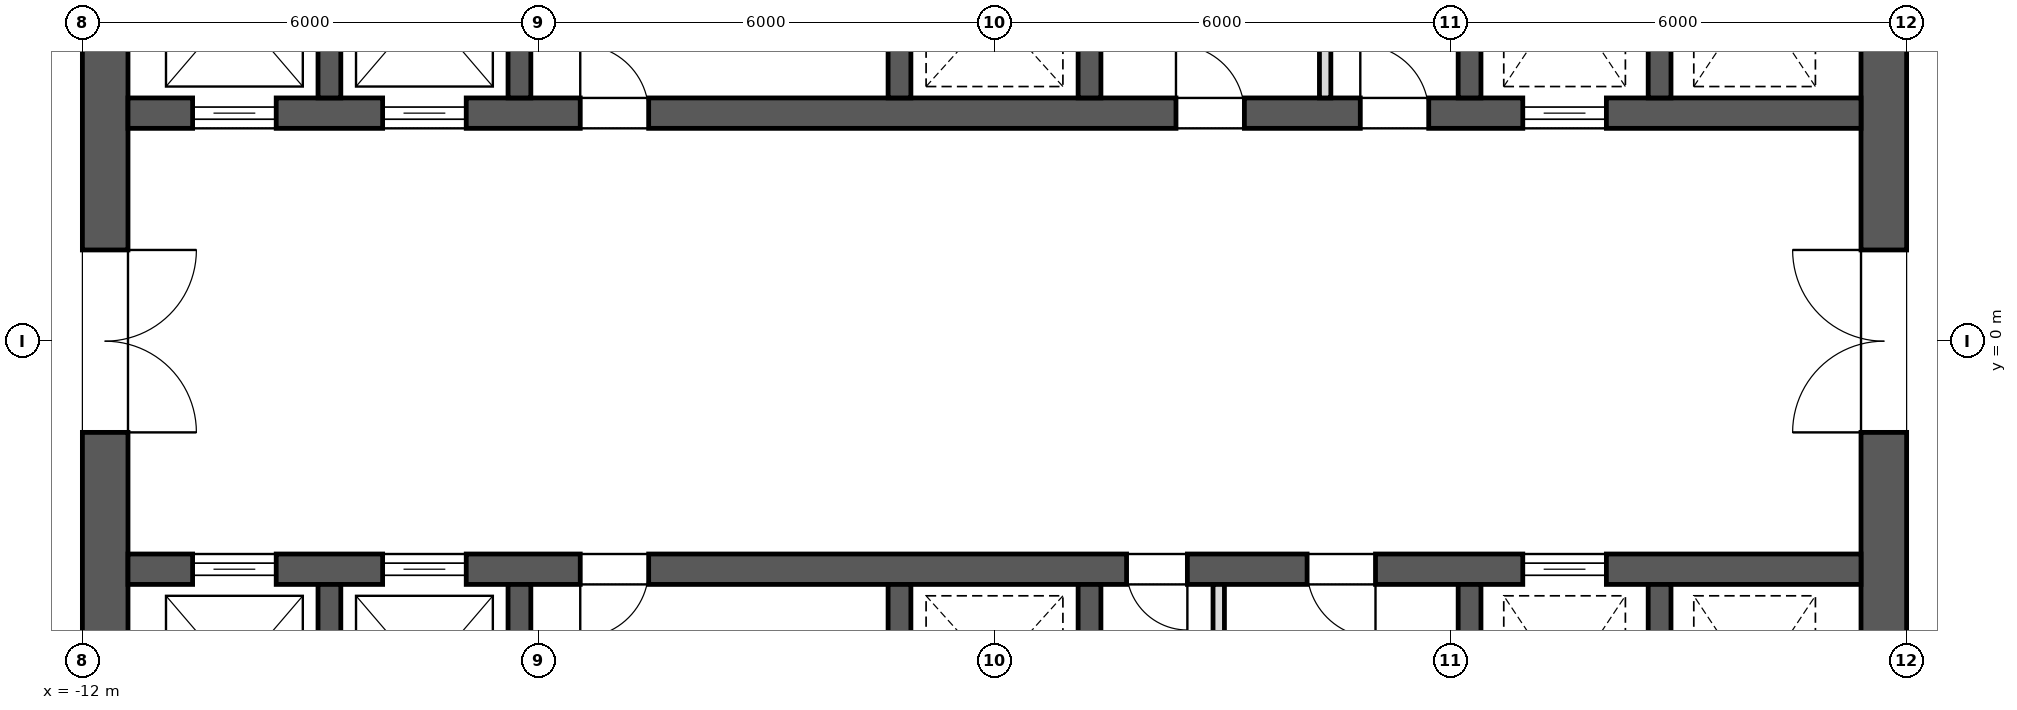
"""IFC4 building model, lengths in metres.
Left out: names, types, materials, properties, quantities, classifications, styles, units other than length and angle.
Written with IfcOpenShell. Run it as: python <this file> out.ifc"""

import sys

from ifc_helpers import new_model, si_unit, direction, frame, frame_2d, origin, place, context, subcontext, project, spatial, rectangle, extrude, element, fill, save


model = new_model("IFC4")
c1 = context("Model", 3, precision=1e-05, world=origin(), true_north=direction((0.0, 1.0)))
c2 = subcontext(c1, "Body", "Model", "MODEL_VIEW")
j1 = project(units=[si_unit("LENGTHUNIT", "METRE"), si_unit("PLANEANGLEUNIT", "RADIAN")], contexts=[c1])
p1 = place(None, origin())
s1 = spatial("IfcSite", under=j1, at=p1, CompositionType="ELEMENT")
p2 = place(p1, origin())
s2 = spatial("IfcBuilding", under=s1, at=p2, CompositionType="ELEMENT")
p3 = place(p2, frame((0.0, 0.0, 324.3)))
s3 = spatial("IfcBuildingStorey", under=s2, at=p3, CompositionType="ELEMENT", Elevation=324.3)
p4 = place(p3, frame((11.7, -11.4, 0.0), z_axis=(0.0, 0.0, 1.0), x_axis=(0.0, 1.0, 0.0)))
e1 = element("IfcWall", 1, at=p4, inside=s3, PredefinedType="SHEAR", context=c2, shape_type="SweptSolid", body=[
    extrude(rectangle(XDim=22.8, YDim=0.6, at=frame_2d((11.4, 0.0))), origin(), (0.0, 0.0, 1.0), 4.0),
])
p5 = place(p4, frame((10.2, 0.0, 0.0)))
e2 = element("IfcOpeningElement", 2, at=p5, cuts=e1, PredefinedType="OPENING", context=c2, shape_type="SweptSolid", body=[
    extrude(rectangle(XDim=2.4, YDim=2.1, at=frame_2d((1.2, 1.05))), frame((0.0, 0.312, 0.0), z_axis=(0.0, -1.0, 0.0), x_axis=(1.0, 0.0, 0.0)), (0.0, 0.0, 1.0), 0.624),
])
p6 = place(p4, frame((19.5, 0.0, 0.0)))
e3 = element("IfcOpeningElement", 3, at=p6, cuts=e1, PredefinedType="OPENING", context=c2, shape_type="SweptSolid", body=[
    extrude(rectangle(XDim=1.2, YDim=2.1, at=frame_2d((0.6, 1.05))), frame((0.0, 0.312, 0.0), z_axis=(0.0, -1.0, 0.0), x_axis=(1.0, 0.0, 0.0)), (0.0, 0.0, 1.0), 0.624),
])
p7 = place(p4, frame((2.1, 0.0, 0.0)))
e4 = element("IfcOpeningElement", 4, at=p7, cuts=e1, PredefinedType="OPENING", context=c2, shape_type="SweptSolid", body=[
    extrude(rectangle(XDim=1.2, YDim=2.1, at=frame_2d((0.6, 1.05))), frame((0.0, 0.312, 0.0), z_axis=(0.0, -1.0, 0.0), x_axis=(1.0, 0.0, 0.0)), (0.0, 0.0, 1.0), 0.624),
])
p8 = place(p3, frame((-11.7, -11.4, 0.0), z_axis=(0.0, 0.0, 1.0), x_axis=(0.0, 1.0, 0.0)))
e5 = element("IfcWall", 5, at=p8, inside=s3, PredefinedType="SHEAR", context=c2, shape_type="SweptSolid", body=[
    extrude(rectangle(XDim=22.8, YDim=0.6, at=frame_2d((11.4, 0.0))), origin(), (0.0, 0.0, 1.0), 4.0),
])
p9 = place(p8, frame((10.2, 0.0, 0.0)))
e6 = element("IfcOpeningElement", 6, at=p9, cuts=e5, PredefinedType="OPENING", context=c2, shape_type="SweptSolid", body=[
    extrude(rectangle(XDim=2.4, YDim=2.1, at=frame_2d((1.2, 1.05))), frame((0.0, 0.312, 0.0), z_axis=(0.0, -1.0, 0.0), x_axis=(1.0, 0.0, 0.0)), (0.0, 0.0, 1.0), 0.624),
])
p10 = place(p8, frame((18.925, 0.0, 0.0)))
e7 = element("IfcOpeningElement", 7, at=p10, cuts=e5, PredefinedType="OPENING", context=c2, shape_type="SweptSolid", body=[
    extrude(rectangle(XDim=1.2, YDim=2.1, at=frame_2d((0.6, 1.05))), frame((0.0, 0.312, 0.0), z_axis=(0.0, -1.0, 0.0), x_axis=(1.0, 0.0, 0.0)), (0.0, 0.0, 1.0), 0.624),
])
p11 = place(p8, frame((2.675, 0.0, 0.0)))
e8 = element("IfcOpeningElement", 8, at=p11, cuts=e5, PredefinedType="OPENING", context=c2, shape_type="SweptSolid", body=[
    extrude(rectangle(XDim=1.2, YDim=2.1, at=frame_2d((0.6, 1.05))), frame((0.0, 0.312, 0.0), z_axis=(0.0, -1.0, 0.0), x_axis=(1.0, 0.0, 0.0)), (0.0, 0.0, 1.0), 0.624),
])
p12 = place(p3, frame((-11.4, 3.0, 0.0), z_axis=(0.0, 0.0, 1.0), x_axis=(1.0, 0.0, 0.0)))
e9 = element("IfcWall", 9, at=p12, inside=s3, PredefinedType="SHEAR", context=c2, shape_type="SweptSolid", body=[
    extrude(rectangle(XDim=22.8, YDim=0.4, at=frame_2d((11.4, 0.0))), origin(), (0.0, 0.0, 1.0), 4.0),
])
p13 = place(p12, frame((0.85, 0.0, 0.0)))
e10 = element("IfcOpeningElement", 10, at=p13, cuts=e9, PredefinedType="OPENING", context=c2, shape_type="SweptSolid", body=[
    extrude(rectangle(XDim=1.1, YDim=2.1, at=frame_2d((0.55, 1.05))), frame((0.0, 0.212, 0.0), z_axis=(0.0, -1.0, 0.0), x_axis=(1.0, 0.0, 0.0)), (0.0, 0.0, 1.0), 0.424),
])
p14 = place(p12, frame((3.35, 0.0, 0.0)))
e11 = element("IfcOpeningElement", 11, at=p14, cuts=e9, PredefinedType="OPENING", context=c2, shape_type="SweptSolid", body=[
    extrude(rectangle(XDim=1.1, YDim=2.1, at=frame_2d((0.55, 1.05))), frame((0.0, 0.212, 0.0), z_axis=(0.0, -1.0, 0.0), x_axis=(1.0, 0.0, 0.0)), (0.0, 0.0, 1.0), 0.424),
])
p15 = place(p12, frame((18.35, 0.0, 0.0)))
e12 = element("IfcOpeningElement", 12, at=p15, cuts=e9, PredefinedType="OPENING", context=c2, shape_type="SweptSolid", body=[
    extrude(rectangle(XDim=1.1, YDim=2.1, at=frame_2d((0.55, 1.05))), frame((0.0, 0.212, 0.0), z_axis=(0.0, -1.0, 0.0), x_axis=(1.0, 0.0, 0.0)), (0.0, 0.0, 1.0), 0.424),
])
p16 = place(p12, frame((13.788, 0.0, 0.0)))
e13 = element("IfcOpeningElement", 13, at=p16, cuts=e9, PredefinedType="OPENING", context=c2, shape_type="SweptSolid", body=[
    extrude(rectangle(XDim=0.9, YDim=2.1, at=frame_2d((0.45, 1.05))), frame((0.0, 0.212, 0.0), z_axis=(0.0, -1.0, 0.0), x_axis=(1.0, 0.0, 0.0)), (0.0, 0.0, 1.0), 0.424),
])
p17 = place(p12, frame((16.212, 0.0, 0.0)))
e14 = element("IfcOpeningElement", 14, at=p17, cuts=e9, PredefinedType="OPENING", context=c2, shape_type="SweptSolid", body=[
    extrude(rectangle(XDim=0.9, YDim=2.1, at=frame_2d((0.45, 1.05))), frame((0.0, 0.212, 0.0), z_axis=(0.0, -1.0, 0.0), x_axis=(1.0, 0.0, 0.0)), (0.0, 0.0, 1.0), 0.424),
])
p18 = place(p12, frame((5.95, 0.0, 0.0)))
e15 = element("IfcOpeningElement", 15, at=p18, cuts=e9, PredefinedType="OPENING", context=c2, shape_type="SweptSolid", body=[
    extrude(rectangle(XDim=0.9, YDim=2.1, at=frame_2d((0.45, 1.05))), frame((0.0, 0.212, 0.0), z_axis=(0.0, -1.0, 0.0), x_axis=(1.0, 0.0, 0.0)), (0.0, 0.0, 1.0), 0.424),
])
for number, where, z_axis, x_axis in (
    (16, (-8.75, 3.2, 0.0), (0.0, 0.0, 1.0), (0.0, 1.0, 0.0)),
    (17, (-6.25, 3.2, 0.0), (0.0, 0.0, 1.0), (0.0, 1.0, 0.0)),
    (18, (-1.25, 3.2, 0.0), (0.0, 0.0, 1.0), (0.0, 1.0, 0.0)),
    (19, (1.25, 3.2, 0.0), (0.0, 0.0, 1.0), (0.0, 1.0, 0.0)),
    (20, (6.25, 3.2, 0.0), (0.0, 0.0, 1.0), (0.0, 1.0, 0.0)),
    (21, (8.75, 3.2, 0.0), (0.0, 0.0, 1.0), (0.0, 1.0, 0.0)),
):
    element("IfcWall", number, at=place(p3, frame(where, z_axis=z_axis, x_axis=x_axis)), inside=s3, PredefinedType="SHEAR", context=c2, shape_type="SweptSolid", body=[
        extrude(rectangle(XDim=2.9, YDim=0.3, at=frame_2d((1.45, 0.0))), origin(), (0.0, 0.0, 1.0), 4.0),
    ])
p19 = place(p3, frame((-11.4, -3.0, 0.0), z_axis=(0.0, 0.0, 1.0), x_axis=(1.0, 0.0, 0.0)))
e22 = element("IfcWall", 22, at=p19, inside=s3, PredefinedType="SHEAR", context=c2, shape_type="SweptSolid", body=[
    extrude(rectangle(XDim=22.8, YDim=0.4, at=frame_2d((11.4, 0.0))), origin(), (0.0, 0.0, 1.0), 4.0),
])
p20 = place(p19, frame((0.85, 0.0, 0.0)))
e23 = element("IfcOpeningElement", 23, at=p20, cuts=e22, PredefinedType="OPENING", context=c2, shape_type="SweptSolid", body=[
    extrude(rectangle(XDim=1.1, YDim=2.1, at=frame_2d((0.55, 1.05))), frame((0.0, 0.212, 0.0), z_axis=(0.0, -1.0, 0.0), x_axis=(1.0, 0.0, 0.0)), (0.0, 0.0, 1.0), 0.424),
])
p21 = place(p19, frame((3.35, 0.0, 0.0)))
e24 = element("IfcOpeningElement", 24, at=p21, cuts=e22, PredefinedType="OPENING", context=c2, shape_type="SweptSolid", body=[
    extrude(rectangle(XDim=1.1, YDim=2.1, at=frame_2d((0.55, 1.05))), frame((0.0, 0.212, 0.0), z_axis=(0.0, -1.0, 0.0), x_axis=(1.0, 0.0, 0.0)), (0.0, 0.0, 1.0), 0.424),
])
p22 = place(p19, frame((18.35, 0.0, 0.0)))
e25 = element("IfcOpeningElement", 25, at=p22, cuts=e22, PredefinedType="OPENING", context=c2, shape_type="SweptSolid", body=[
    extrude(rectangle(XDim=1.1, YDim=2.1, at=frame_2d((0.55, 1.05))), frame((0.0, 0.212, 0.0), z_axis=(0.0, -1.0, 0.0), x_axis=(1.0, 0.0, 0.0)), (0.0, 0.0, 1.0), 0.424),
])
p23 = place(p19, frame((13.137, 0.0, 0.0)))
e26 = element("IfcOpeningElement", 26, at=p23, cuts=e22, PredefinedType="OPENING", context=c2, shape_type="SweptSolid", body=[
    extrude(rectangle(XDim=0.8, YDim=2.1, at=frame_2d((0.4, 1.05))), frame((0.0, 0.212, 0.0), z_axis=(0.0, -1.0, 0.0), x_axis=(1.0, 0.0, 0.0)), (0.0, 0.0, 1.0), 0.424),
])
p24 = place(p19, frame((15.512, 0.0, 0.0)))
e27 = element("IfcOpeningElement", 27, at=p24, cuts=e22, PredefinedType="OPENING", context=c2, shape_type="SweptSolid", body=[
    extrude(rectangle(XDim=0.9, YDim=2.1, at=frame_2d((0.45, 1.05))), frame((0.0, 0.212, 0.0), z_axis=(0.0, -1.0, 0.0), x_axis=(1.0, 0.0, 0.0)), (0.0, 0.0, 1.0), 0.424),
])
p25 = place(p19, frame((5.95, 0.0, 0.0)))
e28 = element("IfcOpeningElement", 28, at=p25, cuts=e22, PredefinedType="OPENING", context=c2, shape_type="SweptSolid", body=[
    extrude(rectangle(XDim=0.9, YDim=2.1, at=frame_2d((0.45, 1.05))), frame((0.0, 0.212, 0.0), z_axis=(0.0, -1.0, 0.0), x_axis=(1.0, 0.0, 0.0)), (0.0, 0.0, 1.0), 0.424),
])
for number, where, z_axis, x_axis in (
    (29, (-8.75, -6.1, 0.0), (0.0, 0.0, 1.0), (0.0, 1.0, 0.0)),
    (30, (-6.25, -6.1, 0.0), (0.0, 0.0, 1.0), (0.0, 1.0, 0.0)),
    (31, (-1.25, -6.1, 0.0), (0.0, 0.0, 1.0), (0.0, 1.0, 0.0)),
    (32, (1.25, -6.1, 0.0), (0.0, 0.0, 1.0), (0.0, 1.0, 0.0)),
    (33, (6.25, -6.1, 0.0), (0.0, 0.0, 1.0), (0.0, 1.0, 0.0)),
    (34, (8.75, -6.1, 0.0), (0.0, 0.0, 1.0), (0.0, 1.0, 0.0)),
):
    element("IfcWall", number, at=place(p3, frame(where, z_axis=z_axis, x_axis=x_axis)), inside=s3, PredefinedType="SHEAR", context=c2, shape_type="SweptSolid", body=[
        extrude(rectangle(XDim=2.9, YDim=0.3, at=frame_2d((1.45, 0.0))), origin(), (0.0, 0.0, 1.0), 4.0),
    ])
for number, where, z_axis, x_axis in (
    (35, (4.35, 3.2, 0.0), (0.0, 0.0, 1.0), (0.0, 1.0, 0.0)),
    (36, (2.95, -6.1, 0.0), (0.0, 0.0, 1.0), (0.0, 1.0, 0.0)),
):
    element("IfcWall", number, at=place(p3, frame(where, z_axis=z_axis, x_axis=x_axis)), inside=s3, PredefinedType="PARTITIONING", context=c2, shape_type="SweptSolid", body=[
        extrude(rectangle(XDim=2.9, YDim=0.15, at=frame_2d((1.45, 0.0))), origin(), (0.0, 0.0, 1.0), 3.65),
    ])
p26 = place(p13, origin())
e37 = element("IfcDoor", 37, at=p26, inside=s3, OperationType="SLIDING_TO_LEFT", PredefinedType="DOOR", context=c2, shape_type="SweptSolid", body=[
    extrude(rectangle(XDim=1.1, YDim=2.1, at=frame_2d((0.55, 1.05))), frame((0.0, 0.025, 0.0), z_axis=(0.0, -1.0, 0.0), x_axis=(1.0, 0.0, 0.0)), (0.0, 0.0, 1.0), 0.05),
])
fill(e10, e37)
p27 = place(p14, origin())
e38 = element("IfcDoor", 38, at=p27, inside=s3, OperationType="SLIDING_TO_LEFT", PredefinedType="DOOR", context=c2, shape_type="SweptSolid", body=[
    extrude(rectangle(XDim=1.1, YDim=2.1, at=frame_2d((0.55, 1.05))), frame((0.0, 0.025, 0.0), z_axis=(0.0, -1.0, 0.0), x_axis=(1.0, 0.0, 0.0)), (0.0, 0.0, 1.0), 0.05),
])
fill(e11, e38)
p28 = place(p20, origin())
e39 = element("IfcDoor", 39, at=p28, inside=s3, OperationType="SLIDING_TO_LEFT", PredefinedType="DOOR", context=c2, shape_type="SweptSolid", body=[
    extrude(rectangle(XDim=1.1, YDim=2.1, at=frame_2d((0.55, 1.05))), frame((0.0, 0.025, 0.0), z_axis=(0.0, -1.0, 0.0), x_axis=(1.0, 0.0, 0.0)), (0.0, 0.0, 1.0), 0.05),
])
fill(e23, e39)
p29 = place(p21, origin())
e40 = element("IfcDoor", 40, at=p29, inside=s3, OperationType="SLIDING_TO_LEFT", PredefinedType="DOOR", context=c2, shape_type="SweptSolid", body=[
    extrude(rectangle(XDim=1.1, YDim=2.1, at=frame_2d((0.55, 1.05))), frame((0.0, 0.025, 0.0), z_axis=(0.0, -1.0, 0.0), x_axis=(1.0, 0.0, 0.0)), (0.0, 0.0, 1.0), 0.05),
])
fill(e24, e40)
p30 = place(p15, origin())
e41 = element("IfcDoor", 41, at=p30, inside=s3, OperationType="SLIDING_TO_LEFT", PredefinedType="DOOR", context=c2, shape_type="SweptSolid", body=[
    extrude(rectangle(XDim=1.1, YDim=2.1, at=frame_2d((0.55, 1.05))), frame((0.0, 0.025, 0.0), z_axis=(0.0, -1.0, 0.0), x_axis=(1.0, 0.0, 0.0)), (0.0, 0.0, 1.0), 0.05),
])
fill(e12, e41)
p31 = place(p22, origin())
e42 = element("IfcDoor", 42, at=p31, inside=s3, OperationType="SLIDING_TO_LEFT", PredefinedType="DOOR", context=c2, shape_type="SweptSolid", body=[
    extrude(rectangle(XDim=1.1, YDim=2.1, at=frame_2d((0.55, 1.05))), frame((0.0, 0.025, 0.0), z_axis=(0.0, -1.0, 0.0), x_axis=(1.0, 0.0, 0.0)), (0.0, 0.0, 1.0), 0.05),
])
fill(e25, e42)
p32 = place(p9, frame((2.4, 0.0, 0.0), z_axis=(0.0, 0.0, 1.0), x_axis=(-1.0, 0.0, 0.0)))
e43 = element("IfcDoor", 43, at=p32, inside=s3, OperationType="DOUBLE_DOOR_SINGLE_SWING", PredefinedType="DOOR", context=c2, shape_type="SweptSolid", body=[
    extrude(rectangle(XDim=2.4, YDim=2.1, at=frame_2d((1.2, 1.05))), frame((0.0, 0.025, 0.0), z_axis=(0.0, -1.0, 0.0), x_axis=(1.0, 0.0, 0.0)), (0.0, 0.0, 1.0), 0.05),
])
fill(e6, e43)
p33 = place(p5, origin())
e44 = element("IfcDoor", 44, at=p33, inside=s3, OperationType="DOUBLE_DOOR_SINGLE_SWING", PredefinedType="DOOR", context=c2, shape_type="SweptSolid", body=[
    extrude(rectangle(XDim=2.4, YDim=2.1, at=frame_2d((1.2, 1.05))), frame((0.0, 0.025, 0.0), z_axis=(0.0, -1.0, 0.0), x_axis=(1.0, 0.0, 0.0)), (0.0, 0.0, 1.0), 0.05),
])
fill(e2, e44)
p34 = place(p16, origin())
e45 = element("IfcDoor", 45, at=p34, inside=s3, OperationType="SINGLE_SWING_RIGHT", PredefinedType="DOOR", context=c2, shape_type="SweptSolid", body=[
    extrude(rectangle(XDim=0.9, YDim=2.1, at=frame_2d((0.45, 1.05))), frame((0.0, 0.025, 0.0), z_axis=(0.0, -1.0, 0.0), x_axis=(1.0, 0.0, 0.0)), (0.0, 0.0, 1.0), 0.05),
])
fill(e13, e45)
p35 = place(p17, origin())
e46 = element("IfcDoor", 46, at=p35, inside=s3, OperationType="SINGLE_SWING_RIGHT", PredefinedType="DOOR", context=c2, shape_type="SweptSolid", body=[
    extrude(rectangle(XDim=0.9, YDim=2.1, at=frame_2d((0.45, 1.05))), frame((0.0, 0.025, 0.0), z_axis=(0.0, -1.0, 0.0), x_axis=(1.0, 0.0, 0.0)), (0.0, 0.0, 1.0), 0.05),
])
fill(e14, e46)
p36 = place(p18, origin())
e47 = element("IfcDoor", 47, at=p36, inside=s3, OperationType="SINGLE_SWING_RIGHT", PredefinedType="DOOR", context=c2, shape_type="SweptSolid", body=[
    extrude(rectangle(XDim=0.9, YDim=2.1, at=frame_2d((0.45, 1.05))), frame((0.0, 0.025, 0.0), z_axis=(0.0, -1.0, 0.0), x_axis=(1.0, 0.0, 0.0)), (0.0, 0.0, 1.0), 0.05),
])
fill(e15, e47)
p37 = place(p23, frame((0.8, 0.0, 0.0), z_axis=(0.0, 0.0, 1.0), x_axis=(-1.0, 0.0, 0.0)))
e48 = element("IfcDoor", 48, at=p37, inside=s3, OperationType="SINGLE_SWING_RIGHT", PredefinedType="DOOR", context=c2, shape_type="SweptSolid", body=[
    extrude(rectangle(XDim=0.8, YDim=2.1, at=frame_2d((0.4, 1.05))), frame((0.0, 0.025, 0.0), z_axis=(0.0, -1.0, 0.0), x_axis=(1.0, 0.0, 0.0)), (0.0, 0.0, 1.0), 0.05),
])
fill(e26, e48)
p38 = place(p24, frame((0.9, 0.0, 0.0), z_axis=(0.0, 0.0, 1.0), x_axis=(-1.0, 0.0, 0.0)))
e49 = element("IfcDoor", 49, at=p38, inside=s3, OperationType="SINGLE_SWING_RIGHT", PredefinedType="DOOR", context=c2, shape_type="SweptSolid", body=[
    extrude(rectangle(XDim=0.9, YDim=2.1, at=frame_2d((0.45, 1.05))), frame((0.0, 0.025, 0.0), z_axis=(0.0, -1.0, 0.0), x_axis=(1.0, 0.0, 0.0)), (0.0, 0.0, 1.0), 0.05),
])
fill(e27, e49)
p39 = place(p25, frame((0.9, 0.0, 0.0), z_axis=(0.0, 0.0, 1.0), x_axis=(-1.0, 0.0, 0.0)))
e50 = element("IfcDoor", 50, at=p39, inside=s3, OperationType="SINGLE_SWING_LEFT", PredefinedType="DOOR", context=c2, shape_type="SweptSolid", body=[
    extrude(rectangle(XDim=0.9, YDim=2.1, at=frame_2d((0.45, 1.05))), frame((0.0, 0.025, 0.0), z_axis=(0.0, -1.0, 0.0), x_axis=(1.0, 0.0, 0.0)), (0.0, 0.0, 1.0), 0.05),
])
fill(e28, e50)
save(model, sys.argv[1])
